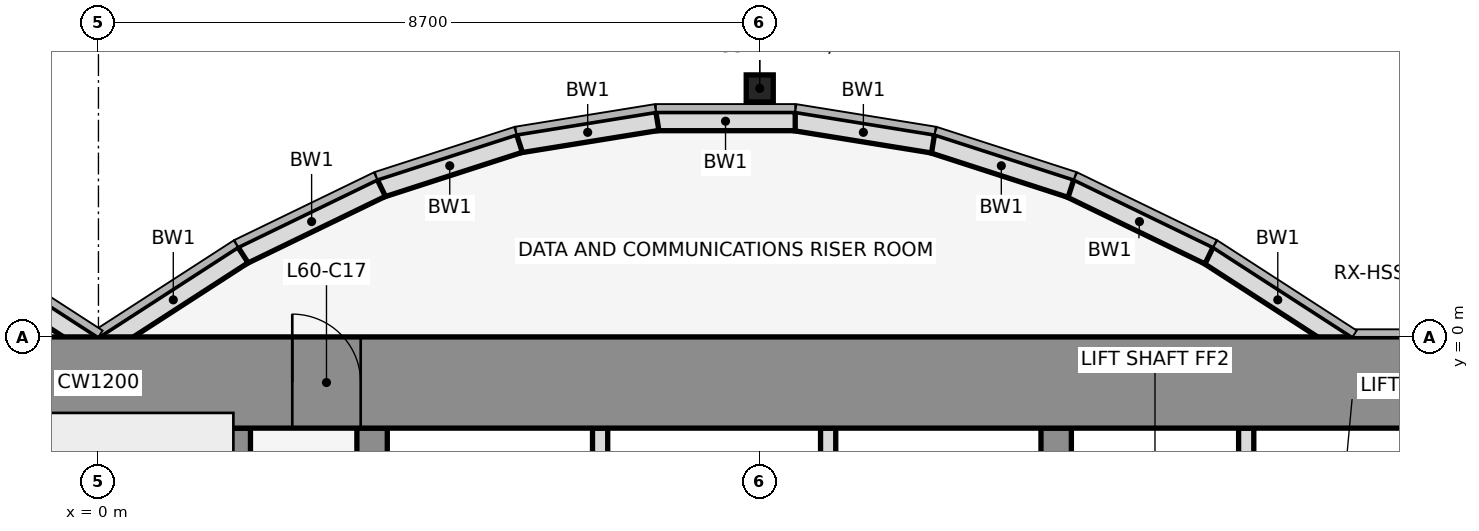
"""IFC4 building model, lengths in metres.
Left out: names, types, materials, properties, quantities, classifications, styles, units other than length and angle.
Written with IfcOpenShell. Run it as: python <this file> out.ifc"""

import sys

from ifc_helpers import new_model, si_unit, direction, frame, frame_2d, origin, origin_2d, place, context, subcontext, project, spatial, rectangle, hollow_rectangle, extrude, element, fill, save


model = new_model("IFC4")
c1 = context("Model", 3, precision=1e-05, world=origin(), true_north=direction((0.0, 1.0)))
c2 = subcontext(c1, "Body", "Model", "MODEL_VIEW")
j1 = project(units=[si_unit("LENGTHUNIT", "METRE"), si_unit("PLANEANGLEUNIT", "RADIAN")], contexts=[c1])
p1 = place(None, origin())
s1 = spatial("IfcSite", under=j1, at=p1, CompositionType="ELEMENT")
p2 = place(p1, origin())
s2 = spatial("IfcBuilding", under=s1, at=p2, CompositionType="ELEMENT")
p3 = place(p2, frame((0.0, 0.0, 266.6)))
s3 = spatial("IfcBuildingStorey", under=s2, at=p3, CompositionType="ELEMENT", Elevation=266.6)
p4 = place(p3, frame((8.7, 3.269, 0.0), z_axis=(0.0, 0.0, 1.0), x_axis=(1.0, 0.0, 0.0)))
e1 = element("IfcColumn", 1, at=p4, inside=s3, PredefinedType="COLUMN", context=c2, shape_type="SweptSolid", body=[
    extrude(hollow_rectangle(XDim=0.356, YDim=0.356, WallThickness=0.012, at=origin_2d()), origin(), (0.0, 0.0, 1.0), 4.2),
])
p5 = place(p3, frame((16.432, -0.105, 0.0), z_axis=(0.0, 0.0, 1.0), x_axis=(-0.83981312244, 0.542875602121, 0.0)))
e2 = element("IfcWall", 2, at=p5, inside=s3, PredefinedType="STANDARD", context=c2, shape_type="SweptSolid", body=[
    extrude(rectangle(XDim=2.183, YDim=0.25, at=frame_2d((1.091, 0.0))), origin(), (0.0, 0.0, 1.0), 4.05),
])
p6 = place(p3, frame((14.612, 1.073, 0.0), z_axis=(0.0, 0.0, 1.0), x_axis=(-0.89982408427, 0.436252928206, 0.0)))
e3 = element("IfcWall", 3, at=p6, inside=s3, PredefinedType="STANDARD", context=c2, shape_type="SweptSolid", body=[
    extrude(rectangle(XDim=2.038, YDim=0.25, at=frame_2d((1.019, 0.0))), origin(), (0.0, 0.0, 1.0), 4.05),
])
p7 = place(p3, frame((12.795, 1.955, 0.0), z_axis=(0.0, 0.0, 1.0), x_axis=(-0.951495806175, 0.307661714928, 0.0)))
e4 = element("IfcWall", 4, at=p7, inside=s3, PredefinedType="STANDARD", context=c2, shape_type="SweptSolid", body=[
    extrude(rectangle(XDim=1.927, YDim=0.25, at=frame_2d((0.963, 0.0))), origin(), (0.0, 0.0, 1.0), 4.05),
])
p8 = place(p3, frame((10.98, 2.543, 0.0), z_axis=(0.0, 0.0, 1.0), x_axis=(-0.987181718931, 0.159600293885, 0.0)))
e5 = element("IfcWall", 5, at=p8, inside=s3, PredefinedType="STANDARD", context=c2, shape_type="SweptSolid", body=[
    extrude(rectangle(XDim=1.857, YDim=0.25, at=frame_2d((0.929, 0.0))), origin(), (0.0, 0.0, 1.0), 4.05),
])
p9 = place(p3, frame((9.167, 2.838, 0.0), z_axis=(0.0, 0.0, 1.0), x_axis=(-1.0, 0.0, 0.0)))
e6 = element("IfcWall", 6, at=p9, inside=s3, PredefinedType="STANDARD", context=c2, shape_type="SweptSolid", body=[
    extrude(rectangle(XDim=1.833, YDim=0.25, at=frame_2d((0.917, 0.0))), origin(), (0.0, 0.0, 1.0), 4.05),
])
p10 = place(p3, frame((7.353, 2.84, 0.0), z_axis=(0.0, 0.0, 1.0), x_axis=(-0.987181718931, -0.159600293885, 0.0)))
e7 = element("IfcWall", 7, at=p10, inside=s3, PredefinedType="STANDARD", context=c2, shape_type="SweptSolid", body=[
    extrude(rectangle(XDim=1.857, YDim=0.25, at=frame_2d((0.929, 0.0))), origin(), (0.0, 0.0, 1.0), 4.05),
])
p11 = place(p3, frame((5.538, 2.548, 0.0), z_axis=(0.0, 0.0, 1.0), x_axis=(-0.951495806175, -0.307661714928, 0.0)))
e8 = element("IfcWall", 8, at=p11, inside=s3, PredefinedType="STANDARD", context=c2, shape_type="SweptSolid", body=[
    extrude(rectangle(XDim=1.927, YDim=0.25, at=frame_2d((0.963, 0.0))), origin(), (0.0, 0.0, 1.0), 4.05),
])
p12 = place(p3, frame((3.721, 1.962, 0.0), z_axis=(0.0, 0.0, 1.0), x_axis=(-0.89982408427, -0.436252928206, 0.0)))
e9 = element("IfcWall", 9, at=p12, inside=s3, PredefinedType="STANDARD", context=c2, shape_type="SweptSolid", body=[
    extrude(rectangle(XDim=2.038, YDim=0.25, at=frame_2d((1.019, 0.0))), origin(), (0.0, 0.0, 1.0), 4.05),
])
for number, where, z_axis, x_axis in (
    (10, (1.901, 1.08, 0.0), (0.0, 0.0, 1.0), (-0.84, -0.543, 0.0)),
    (11, (-0.068, -0.105, 0.0), (0.0, 0.0, 1.0), (-0.84, 0.543, 0.0)),
):
    element("IfcWall", number, at=place(p3, frame(where, z_axis=z_axis, x_axis=x_axis)), inside=s3, PredefinedType="STANDARD", context=c2, shape_type="SweptSolid", body=[
        extrude(rectangle(XDim=2.183, YDim=0.25, at=frame_2d((1.091, 0.0))), origin(), (0.0, 0.0, 1.0), 4.05),
    ])
p13 = place(p3, frame((1.8, -11.8, 0.0), z_axis=(0.0, 0.0, 1.0), x_axis=(0.0, 1.0, 0.0)))
e12 = element("IfcWall", 12, at=p13, inside=s3, PredefinedType="SHEAR", context=c2, shape_type="SweptSolid", body=[
    extrude(rectangle(XDim=10.6, YDim=0.4, at=frame_2d((5.3, 0.0))), origin(), (0.0, 0.0, 1.0), 4.2),
])
p14 = place(p3, frame((3.6, -11.8, 0.0), z_axis=(0.0, 0.0, 1.0), x_axis=(0.0, 1.0, 0.0)))
e13 = element("IfcWall", 13, at=p14, inside=s3, PredefinedType="SHEAR", context=c2, shape_type="SweptSolid", body=[
    extrude(rectangle(XDim=10.6, YDim=0.4, at=frame_2d((5.3, 0.0))), origin(), (0.0, 0.0, 1.0), 4.2),
])
p15 = place(p14, frame((1.35, 0.0, 0.0)))
e14 = element("IfcOpeningElement", 14, at=p15, cuts=e13, PredefinedType="OPENING", context=c2, shape_type="SweptSolid", body=[
    extrude(rectangle(XDim=0.9, YDim=2.1, at=frame_2d((0.45, 1.05))), frame((0.0, 0.212, 0.0), z_axis=(0.0, -1.0, 0.0), x_axis=(1.0, 0.0, 0.0)), (0.0, 0.0, 1.0), 0.424),
])
for number, where, z_axis, x_axis in (
    (15, (6.6, -4.6, 0.0), (0.0, 0.0, 1.0), (0.0, 1.0, 0.0)),
    (16, (9.6, -4.6, 0.0), (0.0, 0.0, 1.0), (0.0, 1.0, 0.0)),
):
    element("IfcWall", number, at=place(p3, frame(where, z_axis=z_axis, x_axis=x_axis)), inside=s3, PredefinedType="PARTITIONING", context=c2, shape_type="SweptSolid", body=[
        extrude(rectangle(XDim=3.4, YDim=0.2, at=frame_2d((1.7, 0.0))), origin(), (0.0, 0.0, 1.0), 3.118),
    ])
p16 = place(p3, frame((12.6, -11.8, 0.0), z_axis=(0.0, 0.0, 1.0), x_axis=(0.0, 1.0, 0.0)))
e17 = element("IfcWall", 17, at=p16, inside=s3, PredefinedType="SHEAR", context=c2, shape_type="SweptSolid", body=[
    extrude(rectangle(XDim=10.6, YDim=0.4, at=frame_2d((5.3, 0.0))), origin(), (0.0, 0.0, 1.0), 4.2),
])
p17 = place(p16, frame((4.75, 0.0, 0.0)))
e18 = element("IfcOpeningElement", 18, at=p17, cuts=e17, PredefinedType="OPENING", context=c2, shape_type="SweptSolid", body=[
    extrude(rectangle(XDim=1.1, YDim=2.1, at=frame_2d((0.55, 1.05))), frame((0.0, 0.212, 0.0), z_axis=(0.0, -1.0, 0.0), x_axis=(1.0, 0.0, 0.0)), (0.0, 0.0, 1.0), 0.424),
])
p18 = place(p3, frame((15.1, -4.6, 0.0), z_axis=(0.0, 0.0, 1.0), x_axis=(0.0, 1.0, 0.0)))
e19 = element("IfcWall", 19, at=p18, inside=s3, PredefinedType="PARTITIONING", context=c2, shape_type="SweptSolid", body=[
    extrude(rectangle(XDim=3.4, YDim=0.2, at=frame_2d((1.7, 0.0))), origin(), (0.0, 0.0, 1.0), 3.118),
])
p19 = place(p3, frame((-22.0, -0.6, 0.0), z_axis=(0.0, 0.0, 1.0), x_axis=(1.0, 0.0, 0.0)))
e20 = element("IfcWall", 20, at=p19, inside=s3, PredefinedType="SHEAR", context=c2, shape_type="SweptSolid", body=[
    extrude(rectangle(XDim=44.0, YDim=1.2, at=frame_2d((22.0, 0.0))), origin(), (0.0, 0.0, 1.0), 4.2),
])
p20 = place(p19, frame((18.55, 0.0, 0.0)))
e21 = element("IfcOpeningElement", 21, at=p20, cuts=e20, PredefinedType="OPENING", context=c2, shape_type="SweptSolid", body=[
    extrude(rectangle(XDim=0.9, YDim=2.1, at=frame_2d((0.45, 1.05))), frame((0.0, 0.612, 0.0), z_axis=(0.0, -1.0, 0.0), x_axis=(1.0, 0.0, 0.0)), (0.0, 0.0, 1.0), 1.224),
])
p21 = place(p19, frame((24.55, 0.0, 0.0)))
e22 = element("IfcOpeningElement", 22, at=p21, cuts=e20, PredefinedType="OPENING", context=c2, shape_type="SweptSolid", body=[
    extrude(rectangle(XDim=0.9, YDim=2.1, at=frame_2d((0.45, 1.05))), frame((0.0, 0.612, 0.0), z_axis=(0.0, -1.0, 0.0), x_axis=(1.0, 0.0, 0.0)), (0.0, 0.0, 1.0), 1.224),
])
p22 = place(p21, origin())
e23 = element("IfcDoor", 23, at=p22, inside=s3, OperationType="SINGLE_SWING_LEFT", PredefinedType="DOOR", context=c2, shape_type="SweptSolid", body=[
    extrude(rectangle(XDim=0.9, YDim=2.1, at=frame_2d((0.45, 1.05))), frame((0.0, 0.025, 0.0), z_axis=(0.0, -1.0, 0.0), x_axis=(1.0, 0.0, 0.0)), (0.0, 0.0, 1.0), 0.05),
])
fill(e22, e23)
save(model, sys.argv[1])
